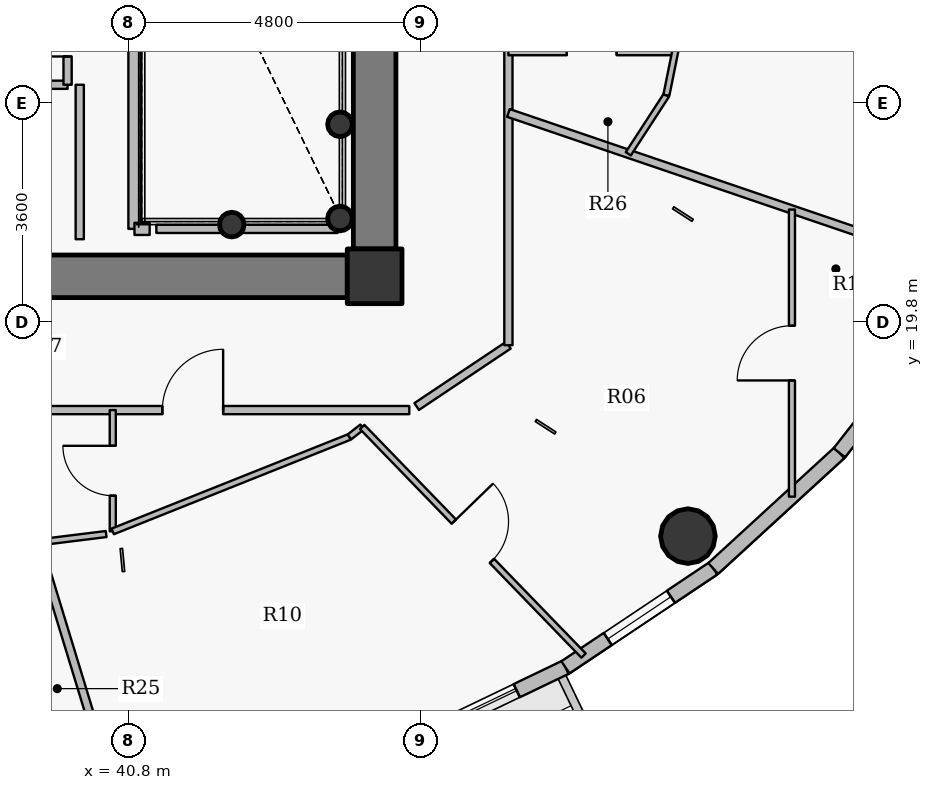
"""IFC4 building model, lengths in metres.
Left out: names, types, materials, properties, quantities, classifications, styles, units other than length and angle.
Written with IfcOpenShell. Run it as: python <this file> out.ifc"""

import sys

from ifc_helpers import new_model, si_unit, direction, frame, frame_2d, origin, origin_2d, place, context, subcontext, project, spatial, rectangle, hollow_circle, extrude, source, transform, mapped, element, fill, save


model = new_model("IFC4")
c1 = context("Model", 3, precision=1e-05, world=origin(), true_north=direction((0.0, 1.0)))
c2 = subcontext(c1, "Body", "Model", "MODEL_VIEW")
j1 = project(units=[si_unit("LENGTHUNIT", "METRE"), si_unit("PLANEANGLEUNIT", "RADIAN")], contexts=[c1])
p1 = place(None, origin())
s1 = spatial("IfcSite", under=j1, at=p1, CompositionType="ELEMENT")
p2 = place(p1, origin())
s2 = spatial("IfcBuilding", under=s1, at=p2, CompositionType="ELEMENT")
p3 = place(p2, frame((0.0, 0.0, 331.6)))
s3 = spatial("IfcBuildingStorey", under=s2, at=p3, CompositionType="ELEMENT", Elevation=331.6)
p4 = place(p3, frame((44.85, 20.55, 0.0), z_axis=(0.0, 0.0, 1.0), x_axis=(1.0, 0.0, 0.0)))
e1 = element("IfcColumn", 1, at=p4, inside=s3, PredefinedType="COLUMN", context=c2, shape_type="SweptSolid", body=[
    extrude(rectangle(XDim=0.9, YDim=0.9, at=origin_2d()), origin(), (0.0, 0.0, 1.0), 3.8),
])
for number, where, z_axis, x_axis in (
    (2, (44.28, 21.5, 0.0), (0.0, 0.0, 1.0), (1.0, 0.0, 0.0)),
    (3, (44.28, 23.05, 0.0), (0.0, 0.0, 1.0), (1.0, 0.0, 0.0)),
    (4, (42.5, 21.4, 0.0), (0.0, 0.0, 1.0), (1.0, 0.0, 0.0)),
):
    element("IfcColumn", number, at=place(p3, frame(where, z_axis=z_axis, x_axis=x_axis)), inside=s3, PredefinedType="COLUMN", context=c2, shape_type="SweptSolid", body=[
        extrude(hollow_circle(Radius=0.203, WallThickness=0.016, at=origin_2d()), origin(), (0.0, 0.0, 1.0), 3.8),
    ])
p5 = place(p3, frame((44.85, 33.0, 0.0), z_axis=(0.0, 0.0, 1.0), x_axis=(0.0, -1.0, 0.0)))
e5 = element("IfcWall", 5, at=p5, inside=s3, PredefinedType="SHEAR", context=c2, shape_type="SweptSolid", body=[
    extrude(rectangle(XDim=12.0, YDim=0.7, at=frame_2d((6.0, 0.0))), origin(), (0.0, 0.0, 1.0), 3.1),
])
p6 = place(p3, frame((44.4, 20.55, 0.0), z_axis=(0.0, 0.0, 1.0), x_axis=(-1.0, 0.0, 0.0)))
e6 = element("IfcWall", 6, at=p6, inside=s3, PredefinedType="SHEAR", context=c2, shape_type="SweptSolid", body=[
    extrude(rectangle(XDim=16.8, YDim=0.7, at=frame_2d((8.4, 0.0))), origin(), (0.0, 0.0, 1.0), 3.1),
])
p7 = place(p6, frame((13.0, 0.0, 0.0)))
e7 = element("IfcOpeningElement", 7, at=p7, cuts=e6, PredefinedType="OPENING", context=c2, shape_type="SweptSolid", body=[
    extrude(rectangle(XDim=1.15, YDim=2.15, at=origin_2d()), frame((0.575, 0.36, 1.075), z_axis=(0.0, -1.0, 0.0), x_axis=(1.0, 0.0, 0.0)), (0.0, 0.0, 1.0), 0.72),
])
p8 = place(p6, frame((9.15, 0.0, 0.0)))
e8 = element("IfcOpeningElement", 8, at=p8, cuts=e6, PredefinedType="OPENING", context=c2, shape_type="SweptSolid", body=[
    extrude(rectangle(XDim=1.15, YDim=2.15, at=origin_2d()), frame((0.575, 0.36, 1.075), z_axis=(0.0, -1.0, 0.0), x_axis=(1.0, 0.0, 0.0)), (0.0, 0.0, 1.0), 0.72),
])
p9 = place(p3, frame((50.002, 16.277, 0.0), z_axis=(0.0, 0.0, 1.0), x_axis=(1.0, 0.0, 0.0)))
e9 = element("IfcColumn", 9, at=p9, inside=s3, PredefinedType="COLUMN", context=c2, shape_type="SweptSolid", body=[
    extrude(hollow_circle(Radius=0.45, WallThickness=0.028, at=origin_2d()), origin(), (0.0, 0.0, 1.0), 3.8),
])
p10 = place(p3, frame((47.988, 14.12, 0.0), z_axis=(0.0, 0.0, 1.0), x_axis=(-0.901557057889, -0.432660226241, 0.0)))
e10 = element("IfcWall", 10, at=p10, inside=s3, PredefinedType="SOLIDWALL", context=c2, shape_type="SweptSolid", body=[
    extrude(rectangle(XDim=3.025, YDim=0.24, at=frame_2d((1.513, 0.0))), origin(), (0.0, 0.0, 1.0), 3.55),
])
p11 = place(p10, frame((0.888, 0.0, 0.9)))
e11 = element("IfcOpeningElement", 11, at=p11, cuts=e10, PredefinedType="OPENING", context=c2, shape_type="SweptSolid", body=[
    extrude(rectangle(XDim=1.25, YDim=1.65, at=origin_2d()), frame((0.625, 0.13, 0.825), z_axis=(0.0, -1.0, 0.0), x_axis=(1.0, 0.0, 0.0)), (0.0, 0.0, 1.0), 0.26),
])
p12 = place(p3, frame((50.419, 15.746, 0.0), z_axis=(0.0, 0.0, 1.0), x_axis=(-0.831201688654, -0.555970999944, 0.0)))
e12 = element("IfcWall", 12, at=p12, inside=s3, PredefinedType="SOLIDWALL", context=c2, shape_type="SweptSolid", body=[
    extrude(rectangle(XDim=2.925, YDim=0.24, at=frame_2d((1.462, 0.0))), origin(), (0.0, 0.0, 1.0), 3.55),
])
p13 = place(p12, frame((0.837, 0.0, 0.9)))
e13 = element("IfcOpeningElement", 13, at=p13, cuts=e12, PredefinedType="OPENING", context=c2, shape_type="SweptSolid", body=[
    extrude(rectangle(XDim=1.25, YDim=1.65, at=origin_2d()), frame((0.625, 0.13, 0.825), z_axis=(0.0, -1.0, 0.0), x_axis=(1.0, 0.0, 0.0)), (0.0, 0.0, 1.0), 0.26),
])
p14 = place(p3, frame((52.493, 17.648, 0.0), z_axis=(0.0, 0.0, 1.0), x_axis=(-0.737020907932, -0.675869944051, 0.0)))
e14 = element("IfcWall", 14, at=p14, inside=s3, PredefinedType="SOLIDWALL", context=c2, shape_type="SweptSolid", body=[
    extrude(rectangle(XDim=2.815, YDim=0.24, at=frame_2d((1.407, 0.0))), origin(), (0.0, 0.0, 1.0), 3.55),
])
p15 = place(p3, frame((54.161, 19.779, 0.0), z_axis=(0.0, 0.0, 1.0), x_axis=(-0.616286367698, -0.78752213492, 0.0)))
e15 = element("IfcWall", 15, at=p15, inside=s3, PredefinedType="SOLIDWALL", context=c2, shape_type="SweptSolid", body=[
    extrude(rectangle(XDim=2.706, YDim=0.24, at=frame_2d((1.353, 0.0))), origin(), (0.0, 0.0, 1.0), 3.55),
])
p16 = place(p3, frame((26.58, 18.35, 0.0), z_axis=(0.0, 0.0, 1.0), x_axis=(1.0, 0.0, 0.0)))
e16 = element("IfcWall", 16, at=p16, inside=s3, PredefinedType="PARTITIONING", context=c2, shape_type="SweptSolid", body=[
    extrude(rectangle(XDim=18.84, YDim=0.135, at=frame_2d((9.42, 0.0))), origin(), (0.0, 0.0, 1.0), 3.085),
])
p17 = place(p16, frame((0.94, 0.0, 0.0)))
e17 = element("IfcOpeningElement", 17, at=p17, cuts=e16, PredefinedType="OPENING", context=c2, shape_type="SweptSolid", body=[
    extrude(rectangle(XDim=1.0, YDim=2.15, at=origin_2d()), frame((0.5, 0.078, 1.075), z_axis=(0.0, -1.0, 0.0), x_axis=(1.0, 0.0, 0.0)), (0.0, 0.0, 1.0), 0.155),
])
p18 = place(p16, frame((6.621, 0.0, 0.0)))
e18 = element("IfcOpeningElement", 18, at=p18, cuts=e16, PredefinedType="OPENING", context=c2, shape_type="SweptSolid", body=[
    extrude(rectangle(XDim=1.0, YDim=2.15, at=origin_2d()), frame((0.5, 0.078, 1.075), z_axis=(0.0, -1.0, 0.0), x_axis=(1.0, 0.0, 0.0)), (0.0, 0.0, 1.0), 0.155),
])
p19 = place(p16, frame((14.778, 0.0, 0.0)))
e19 = element("IfcOpeningElement", 19, at=p19, cuts=e16, PredefinedType="OPENING", context=c2, shape_type="SweptSolid", body=[
    extrude(rectangle(XDim=1.0, YDim=2.15, at=origin_2d()), frame((0.5, 0.078, 1.075), z_axis=(0.0, -1.0, 0.0), x_axis=(1.0, 0.0, 0.0)), (0.0, 0.0, 1.0), 0.155),
])
p20 = place(p3, frame((35.45, 23.7, 0.0), z_axis=(0.0, 0.0, 1.0), x_axis=(1.0, 0.0, 0.0)))
e20 = element("IfcWall", 20, at=p20, inside=s3, PredefinedType="PARTITIONING", context=c2, shape_type="SweptSolid", body=[
    extrude(rectangle(XDim=4.35, YDim=0.135, at=frame_2d((2.175, 0.0))), origin(), (0.0, 0.0, 1.0), 3.135),
])
p21 = place(p20, frame((2.905, 0.0, 0.0)))
e21 = element("IfcOpeningElement", 21, at=p21, cuts=e20, PredefinedType="OPENING", context=c2, shape_type="SweptSolid", body=[
    extrude(rectangle(XDim=1.1, YDim=2.15, at=origin_2d()), frame((0.55, 0.078, 1.075), z_axis=(0.0, -1.0, 0.0), x_axis=(1.0, 0.0, 0.0)), (0.0, 0.0, 1.0), 0.155),
])
p22 = place(p3, frame((39.304, 16.171, 0.0), z_axis=(0.0, 0.0, 1.0), x_axis=(0.992405921313, 0.123006045959, 0.0)))
e22 = element("IfcWall", 22, at=p22, inside=s3, PredefinedType="PARTITIONING", context=c2, shape_type="SweptSolid", body=[
    extrude(rectangle(XDim=1.139, YDim=0.1, at=frame_2d((0.57, 0.0))), origin(), (0.0, 0.0, 1.0), 3.085),
])
p23 = place(p3, frame((39.304, 16.171, 0.0), z_axis=(0.0, 0.0, 1.0), x_axis=(0.291820739467, -0.956473029425, 0.0)))
e23 = element("IfcWall", 23, at=p23, inside=s3, PredefinedType="PARTITIONING", context=c2, shape_type="SweptSolid", body=[
    extrude(rectangle(XDim=4.834, YDim=0.135, at=frame_2d((2.417, 0.0))), origin(), (0.0, 0.0, 1.0), 3.035),
])
p24 = place(p3, frame((39.8, 23.7, 0.0), z_axis=(0.0, 0.0, 1.0), x_axis=(0.0, 1.0, 0.0)))
e24 = element("IfcWall", 24, at=p24, inside=s3, PredefinedType="PARTITIONING", context=c2, shape_type="SweptSolid", body=[
    extrude(rectangle(XDim=1.75, YDim=0.135, at=frame_2d((0.875, 0.0))), origin(), (0.0, 0.0, 1.0), 3.55),
])
p25 = place(p24, frame((0.465, 0.0, 0.0)))
e25 = element("IfcOpeningElement", 25, at=p25, cuts=e24, PredefinedType="OPENING", context=c2, shape_type="SweptSolid", body=[
    extrude(rectangle(XDim=0.82, YDim=2.1, at=origin_2d()), frame((0.41, 0.078, 1.05), z_axis=(0.0, -1.0, 0.0), x_axis=(1.0, 0.0, 0.0)), (0.0, 0.0, 1.0), 0.155),
])
p26 = place(p3, frame((40.543, 16.355, 0.0), z_axis=(0.0, 0.0, 1.0), x_axis=(0.0, 1.0, 0.0)))
e26 = element("IfcWall", 26, at=p26, inside=s3, PredefinedType="PARTITIONING", context=c2, shape_type="SweptSolid", body=[
    extrude(rectangle(XDim=1.995, YDim=0.1, at=frame_2d((0.998, 0.0))), origin(), (0.0, 0.0, 1.0), 3.085),
])
p27 = place(p26, frame((0.588, 0.0, 0.0)))
e27 = element("IfcOpeningElement", 27, at=p27, cuts=e26, PredefinedType="OPENING", context=c2, shape_type="SweptSolid", body=[
    extrude(rectangle(XDim=0.82, YDim=2.1, at=origin_2d()), frame((0.41, 0.06, 1.05), z_axis=(0.0, -1.0, 0.0), x_axis=(1.0, 0.0, 0.0)), (0.0, 0.0, 1.0), 0.12),
])
p28 = place(p3, frame((40.543, 16.355, 0.0), z_axis=(0.0, 0.0, 1.0), x_axis=(0.928785770399, 0.370617043191, 0.0)))
e28 = element("IfcWall", 28, at=p28, inside=s3, PredefinedType="PARTITIONING", context=c2, shape_type="SweptSolid", body=[
    extrude(rectangle(XDim=4.19, YDim=0.1, at=frame_2d((2.095, 0.0))), origin(), (0.0, 0.0, 1.0), 3.085),
])
p29 = place(p3, frame((40.9, 21.33, 0.0), z_axis=(0.0, 0.0, 1.0), x_axis=(0.0, 1.0, 0.0)))
e29 = element("IfcWall", 29, at=p29, inside=s3, PredefinedType="PARTITIONING", context=c2, shape_type="SweptSolid", body=[
    extrude(rectangle(XDim=5.91, YDim=0.2, at=frame_2d((2.955, 0.0))), origin(), (0.0, 0.0, 1.0), 3.085),
])
p30 = place(p3, frame((40.9, 21.33, 0.0), z_axis=(0.0, 0.0, 1.0), x_axis=(1.0, 0.0, 0.0)))
e30 = element("IfcWall", 30, at=p30, inside=s3, PredefinedType="PARTITIONING", context=c2, shape_type="SweptSolid", body=[
    extrude(rectangle(XDim=0.25, YDim=0.2, at=frame_2d((0.125, 0.0))), origin(), (0.0, 0.0, 1.0), 3.085),
])
p31 = place(p3, frame((44.435, 17.908, 0.0), z_axis=(0.0, 0.0, 1.0), x_axis=(0.787427799495, 0.616406895307, 0.0)))
e31 = element("IfcWall", 31, at=p31, inside=s3, PredefinedType="PARTITIONING", context=c2, shape_type="SweptSolid", body=[
    extrude(rectangle(XDim=0.267, YDim=0.1, at=frame_2d((0.133, 0.0))), origin(), (0.0, 0.0, 1.0), 3.55),
])
p32 = place(p3, frame((44.645, 18.073, 0.0), z_axis=(0.0, 0.0, 1.0), x_axis=(0.695656073062, -0.718374991221, 0.0)))
e32 = element("IfcWall", 32, at=p32, inside=s3, PredefinedType="PARTITIONING", context=c2, shape_type="SweptSolid", body=[
    extrude(rectangle(XDim=5.233, YDim=0.1, at=frame_2d((2.617, 0.0))), origin(), (0.0, 0.0, 1.0), 3.035),
])
p33 = place(p32, frame((2.167, 0.0, 0.0)))
e33 = element("IfcOpeningElement", 33, at=p33, cuts=e32, PredefinedType="OPENING", context=c2, shape_type="SweptSolid", body=[
    extrude(rectangle(XDim=0.9, YDim=2.1, at=origin_2d()), frame((0.45, 0.06, 1.05), z_axis=(0.0, -1.0, 0.0), x_axis=(1.0, 0.0, 0.0)), (0.0, 0.0, 1.0), 0.12),
])
p34 = place(p3, frame((45.541, 18.408, 0.0), z_axis=(0.0, 0.0, 1.0), x_axis=(0.831180227396, 0.556003084151, 0.0)))
e34 = element("IfcWall", 34, at=p34, inside=s3, PredefinedType="PARTITIONING", context=c2, shape_type="SweptSolid", body=[
    extrude(rectangle(XDim=1.815, YDim=0.135, at=frame_2d((0.908, 0.0))), origin(), (0.0, 0.0, 1.0), 3.085),
])
p35 = place(p3, frame((47.05, 19.417, 0.0), z_axis=(0.0, 0.0, 1.0), x_axis=(0.0, 1.0, 0.0)))
e35 = element("IfcWall", 35, at=p35, inside=s3, PredefinedType="PARTITIONING", context=c2, shape_type="SweptSolid", body=[
    extrude(rectangle(XDim=15.165, YDim=0.135, at=frame_2d((7.583, 0.0))), origin(), (0.0, 0.0, 1.0), 3.085),
])
p36 = place(p35, frame((9.957, 0.0, 0.0)))
e36 = element("IfcOpeningElement", 36, at=p36, cuts=e35, PredefinedType="OPENING", context=c2, shape_type="SweptSolid", body=[
    extrude(rectangle(XDim=1.0, YDim=2.15, at=origin_2d()), frame((0.5, 0.078, 1.075), z_axis=(0.0, -1.0, 0.0), x_axis=(1.0, 0.0, 0.0)), (0.0, 0.0, 1.0), 0.155),
])
p37 = place(p3, frame((47.05, 23.237, 0.0), z_axis=(0.0, 0.0, 1.0), x_axis=(0.946614475353, -0.32236785673, 0.0)))
e37 = element("IfcWall", 37, at=p37, inside=s3, PredefinedType="PARTITIONING", context=c2, shape_type="SweptSolid", body=[
    extrude(rectangle(XDim=8.007, YDim=0.135, at=frame_2d((4.004, 0.0))), origin(), (0.0, 0.0, 1.0), 3.035),
])
p38 = place(p3, frame((47.05, 24.235, 0.0), z_axis=(0.0, 0.0, 1.0), x_axis=(1.0, 0.0, 0.0)))
e38 = element("IfcWall", 38, at=p38, inside=s3, PredefinedType="PARTITIONING", context=c2, shape_type="SweptSolid", body=[
    extrude(rectangle(XDim=2.741, YDim=0.1, at=frame_2d((1.37, 0.0))), origin(), (0.0, 0.0, 1.0), 3.55),
])
p39 = place(p38, frame((0.96, 0.0, 0.0)))
e39 = element("IfcOpeningElement", 39, at=p39, cuts=e38, PredefinedType="OPENING", context=c2, shape_type="SweptSolid", body=[
    extrude(rectangle(XDim=0.82, YDim=2.1, at=origin_2d()), frame((0.41, 0.06, 1.05), z_axis=(0.0, -1.0, 0.0), x_axis=(1.0, 0.0, 0.0)), (0.0, 0.0, 1.0), 0.12),
])
p40 = place(p3, frame((49.022, 22.565, 0.0), z_axis=(0.0, 0.0, 1.0), x_axis=(0.545436909984, 0.838151881957, 0.0)))
e40 = element("IfcWall", 40, at=p40, inside=s3, PredefinedType="PARTITIONING", context=c2, shape_type="SweptSolid", body=[
    extrude(rectangle(XDim=1.148, YDim=0.1, at=frame_2d((0.574, 0.0))), origin(), (0.0, 0.0, 1.0), 3.55),
])
p41 = place(p3, frame((49.648, 23.527, 0.0), z_axis=(0.0, 0.0, 1.0), x_axis=(0.198249177906, 0.980151653296, 0.0)))
e41 = element("IfcWall", 41, at=p41, inside=s3, PredefinedType="PARTITIONING", context=c2, shape_type="SweptSolid", body=[
    extrude(rectangle(XDim=3.543, YDim=0.1, at=frame_2d((1.771, 0.0))), origin(), (0.0, 0.0, 1.0), 3.085),
])
p42 = place(p3, frame((51.713, 16.926, 0.0), z_axis=(0.0, 0.0, 1.0), x_axis=(0.0, 1.0, 0.0)))
e42 = element("IfcWall", 42, at=p42, inside=s3, PredefinedType="PARTITIONING", context=c2, shape_type="SweptSolid", body=[
    extrude(rectangle(XDim=4.722, YDim=0.1, at=frame_2d((2.361, 0.0))), origin(), (0.0, 0.0, 1.0), 3.035),
])
p43 = place(p42, frame((1.911, 0.0, 0.0)))
e43 = element("IfcOpeningElement", 43, at=p43, cuts=e42, PredefinedType="OPENING", context=c2, shape_type="SweptSolid", body=[
    extrude(rectangle(XDim=0.9, YDim=2.1, at=origin_2d()), frame((0.45, 0.06, 1.05), z_axis=(0.0, -1.0, 0.0), x_axis=(1.0, 0.0, 0.0)), (0.0, 0.0, 1.0), 0.12),
])
p44 = place(p3, frame((44.24, 21.33, 0.0), z_axis=(0.0, 0.0, 1.0), x_axis=(-1.0, 0.0, 0.0)))
e44 = element("IfcWall", 44, at=p44, inside=s3, PredefinedType="PARTITIONING", context=c2, shape_type="SweptSolid", body=[
    extrude(rectangle(XDim=2.98, YDim=0.135, at=frame_2d((1.49, 0.0))), origin(), (0.0, 0.0, 1.0), 3.085),
])
p45 = place(p3, frame((40.0, 23.7, 0.0), z_axis=(0.0, 0.0, 1.0), x_axis=(0.0, -1.0, 0.0)))
e45 = element("IfcWall", 45, at=p45, inside=s3, PredefinedType="PARTITIONING", context=c2, shape_type="SweptSolid", body=[
    extrude(rectangle(XDim=2.54, YDim=0.135, at=frame_2d((1.27, 0.0))), origin(), (0.0, 0.0, 1.0), 3.085),
])
p46 = place(p3, frame((44.41, 20.2, 0.0), z_axis=(0.0, 0.0, 1.0), x_axis=(1.0, 0.0, 0.0)))
e46 = element("IfcWall", 46, at=p46, inside=s3, PredefinedType="PARTITIONING", context=c2, shape_type="SweptSolid", body=[
    extrude(rectangle(XDim=0.79, YDim=0.135, at=frame_2d((0.395, 0.0))), origin(), (0.0, 0.0, 1.0), 3.085),
])
p47 = place(p3, frame((45.2, 20.508, 0.0), z_axis=(0.0, 0.0, 1.0), x_axis=(0.0, 1.0, 0.0)))
e47 = element("IfcWall", 47, at=p47, inside=s3, PredefinedType="PARTITIONING", context=c2, shape_type="SweptSolid", body=[
    extrude(rectangle(XDim=0.482, YDim=0.135, at=frame_2d((0.241, 0.0))), origin(), (0.0, 0.0, 1.0), 3.55),
])
m1 = source(origin(), c2, "Body", "SweptSolid", [
    extrude(rectangle(XDim=1.25, YDim=1.65, at=origin_2d()), frame((0.625, 0.03, 0.825), z_axis=(0.0, -1.0, 0.0), x_axis=(1.0, 0.0, 0.0)), (0.0, 0.0, 1.0), 0.06),
])
p48 = place(p11, origin())
e48 = element("IfcWindow", 48, at=p48, inside=s3, PartitioningType="SINGLE_PANEL", PredefinedType="WINDOW", context=c2, shape_type="MappedRepresentation", body=[
    mapped(m1, transform((0.0, 0.0, 0.0), x_axis=(1.0, 0.0, 0.0), y_axis=(0.0, 1.0, 0.0), z_axis=(0.0, 0.0, 1.0), scale=1.0)),
])
fill(e11, e48)
p49 = place(p13, origin())
e49 = element("IfcWindow", 49, at=p49, inside=s3, PartitioningType="SINGLE_PANEL", PredefinedType="WINDOW", context=c2, shape_type="MappedRepresentation", body=[
    mapped(m1, transform((0.0, 0.0, 0.0), x_axis=(1.0, 0.0, 0.0), y_axis=(0.0, 1.0, 0.0), z_axis=(0.0, 0.0, 1.0), scale=1.0)),
])
fill(e13, e49)
m2 = source(origin(), c2, "Body", "SweptSolid", [
    extrude(rectangle(XDim=1.0, YDim=2.15, at=origin_2d()), frame((0.5, 0.025, 1.075), z_axis=(0.0, -1.0, 0.0), x_axis=(1.0, 0.0, 0.0)), (0.0, 0.0, 1.0), 0.05),
])
p50 = place(p19, origin())
e50 = element("IfcDoor", 50, at=p50, inside=s3, OperationType="SINGLE_SWING_RIGHT", PredefinedType="DOOR", context=c2, shape_type="MappedRepresentation", body=[
    mapped(m2, transform((0.0, 0.0, 0.0), x_axis=(1.0, 0.0, 0.0), y_axis=(0.0, 1.0, 0.0), z_axis=(0.0, 0.0, 1.0), scale=1.0)),
])
fill(e19, e50)
m3 = source(origin(), c2, "Body", "SweptSolid", [
    extrude(rectangle(XDim=0.9, YDim=2.1, at=origin_2d()), frame((0.45, 0.025, 1.05), z_axis=(0.0, -1.0, 0.0), x_axis=(1.0, 0.0, 0.0)), (0.0, 0.0, 1.0), 0.05),
])
p51 = place(p33, origin())
e51 = element("IfcDoor", 51, at=p51, inside=s3, OperationType="SINGLE_SWING_LEFT", PredefinedType="DOOR", context=c2, shape_type="MappedRepresentation", body=[
    mapped(m3, transform((0.0, 0.0, 0.0), x_axis=(1.0, 0.0, 0.0), y_axis=(0.0, 1.0, 0.0), z_axis=(0.0, 0.0, 1.0), scale=1.0)),
])
fill(e33, e51)
m4 = source(origin(), c2, "Body", "SweptSolid", [
    extrude(rectangle(XDim=0.82, YDim=2.1, at=origin_2d()), frame((0.41, 0.025, 1.05), z_axis=(0.0, -1.0, 0.0), x_axis=(1.0, 0.0, 0.0)), (0.0, 0.0, 1.0), 0.05),
])
p52 = place(p27, origin())
e52 = element("IfcDoor", 52, at=p52, inside=s3, OperationType="SINGLE_SWING_RIGHT", PredefinedType="DOOR", context=c2, shape_type="MappedRepresentation", body=[
    mapped(m4, transform((0.0, 0.0, 0.0), x_axis=(1.0, 0.0, 0.0), y_axis=(0.0, 1.0, 0.0), z_axis=(0.0, 0.0, 1.0), scale=1.0)),
])
fill(e27, e52)
p53 = place(p43, origin())
e53 = element("IfcDoor", 53, at=p53, inside=s3, OperationType="SINGLE_SWING_LEFT", PredefinedType="DOOR", context=c2, shape_type="MappedRepresentation", body=[
    mapped(m3, transform((0.0, 0.0, 0.0), x_axis=(1.0, 0.0, 0.0), y_axis=(0.0, 1.0, 0.0), z_axis=(0.0, 0.0, 1.0), scale=1.0)),
])
fill(e43, e53)
p54 = place(p39, origin())
e54 = element("IfcDoor", 54, at=p54, inside=s3, OperationType="SINGLE_SWING_RIGHT", PredefinedType="DOOR", context=c2, shape_type="MappedRepresentation", body=[
    mapped(m4, transform((0.0, 0.0, 0.0), x_axis=(1.0, 0.0, 0.0), y_axis=(0.0, 1.0, 0.0), z_axis=(0.0, 0.0, 1.0), scale=1.0)),
])
fill(e39, e54)
p55 = place(p25, origin())
e55 = element("IfcDoor", 55, at=p55, inside=s3, OperationType="SINGLE_SWING_LEFT", PredefinedType="DOOR", context=c2, shape_type="MappedRepresentation", body=[
    mapped(m4, transform((0.0, 0.0, 0.0), x_axis=(1.0, 0.0, 0.0), y_axis=(0.0, 1.0, 0.0), z_axis=(0.0, 0.0, 1.0), scale=1.0)),
])
fill(e25, e55)
save(model, sys.argv[1])
